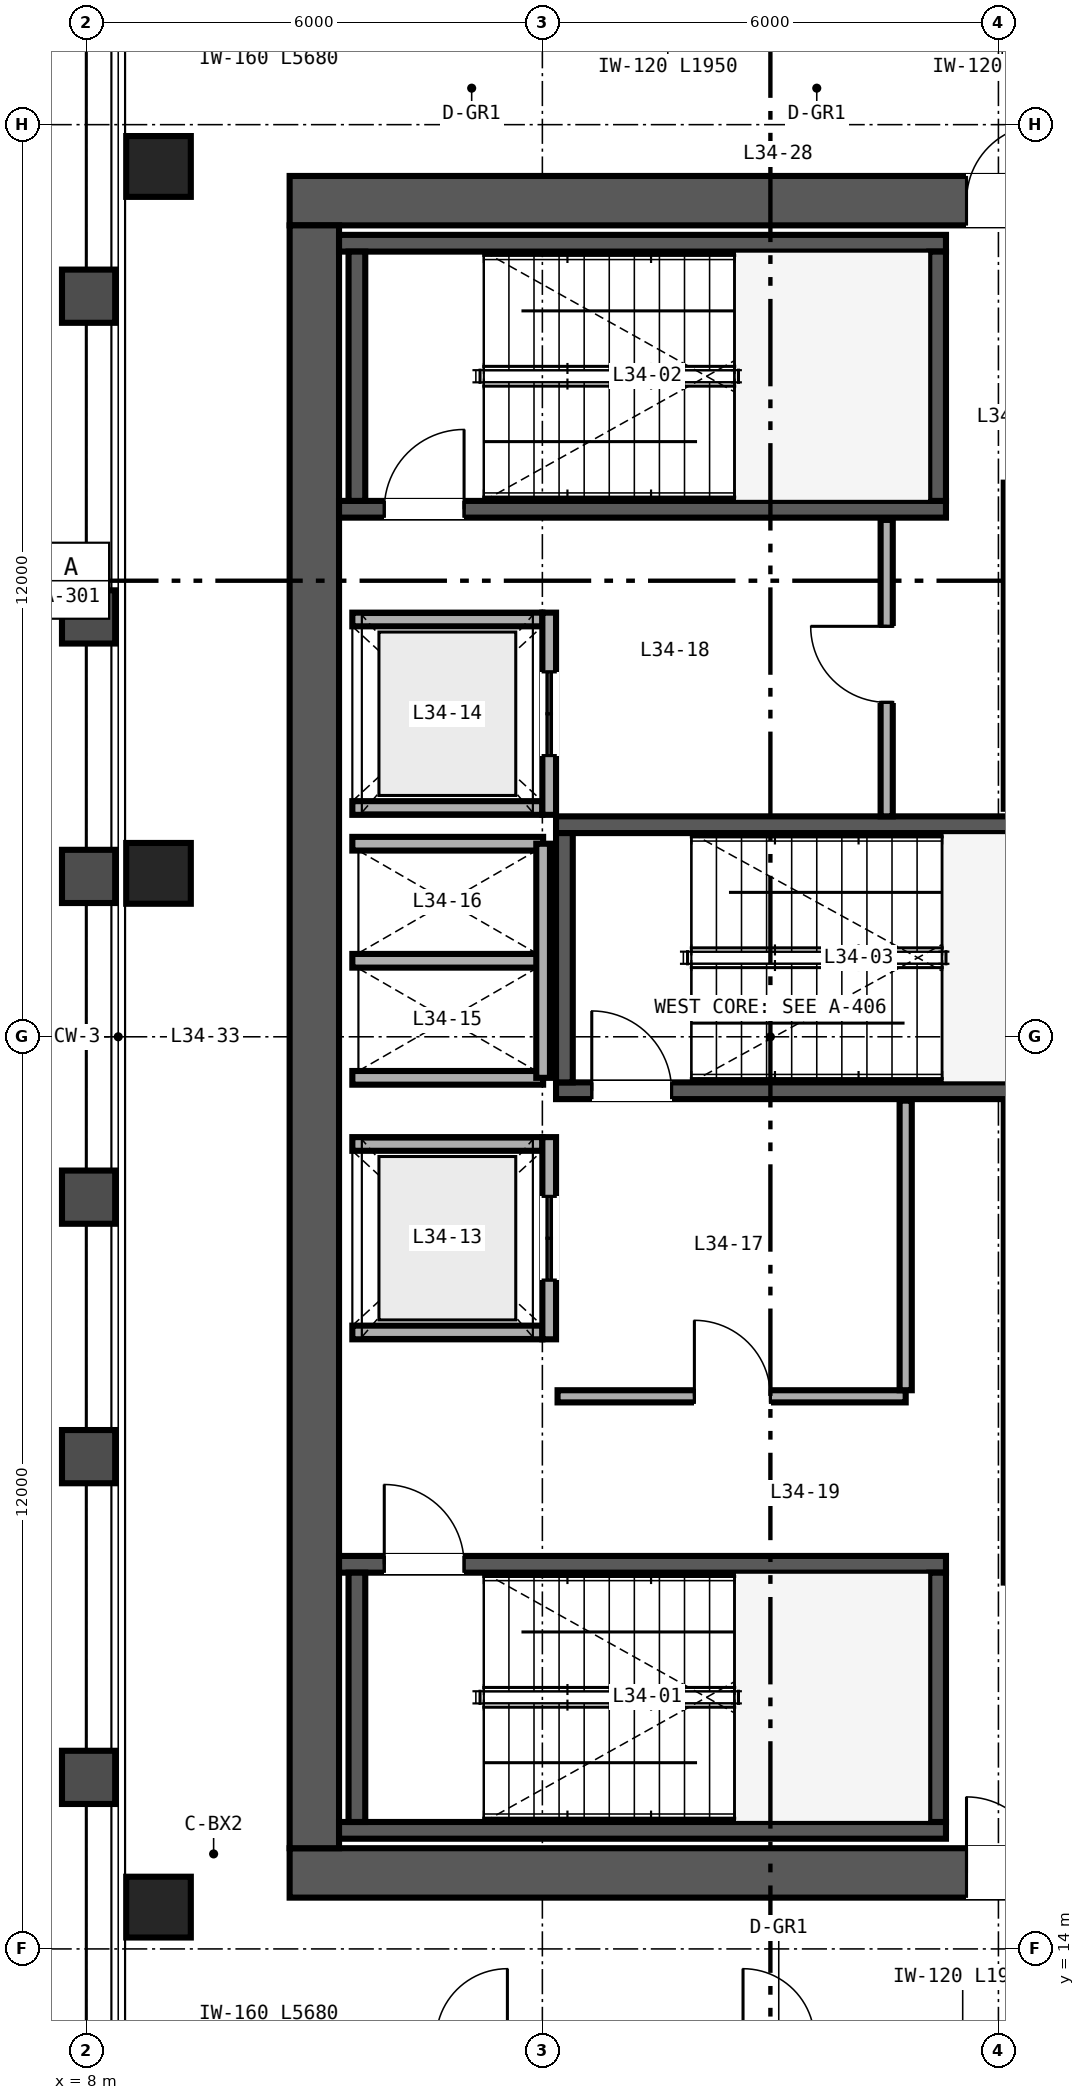
"""IFC4 building model, lengths in metres.
Left out: names, types, materials, properties, quantities, classifications, styles, units other than length and angle.
Written with IfcOpenShell. Run it as: python <this file> out.ifc"""

import sys

from ifc_helpers import new_model, si_unit, direction, frame, frame_2d, origin, origin_2d, place, context, subcontext, project, spatial, rectangle, hollow_rectangle, extrude, source, transform, mapped, element, fill, save


model = new_model("IFC4")
c1 = context("Model", 3, precision=1e-05, world=origin(), true_north=direction((0.0, 1.0)))
c2 = subcontext(c1, "Body", "Model", "MODEL_VIEW")
j1 = project(units=[si_unit("LENGTHUNIT", "METRE"), si_unit("PLANEANGLEUNIT", "RADIAN")], contexts=[c1])
p1 = place(None, origin())
s1 = spatial("IfcSite", under=j1, at=p1, CompositionType="ELEMENT")
p2 = place(p1, origin())
s2 = spatial("IfcBuilding", under=s1, at=p2, CompositionType="ELEMENT")
p3 = place(p2, frame((0.0, 0.0, 136.8)))
s3 = spatial("IfcBuildingStorey", under=s2, at=p3, CompositionType="ELEMENT", Elevation=136.8)
p4 = place(p3, frame((10.675, 15.0, 0.0), z_axis=(0.0, 0.0, 1.0), x_axis=(1.0, 0.0, 0.0)))
e1 = element("IfcWall", 1, at=p4, inside=s3, PredefinedType="SHEAR", context=c2, shape_type="SweptSolid", body=[
    extrude(rectangle(XDim=12.65, YDim=0.65, at=frame_2d((6.325, 0.0))), origin(), (0.0, 0.0, 1.0), 3.36),
])
p5 = place(p4, frame((8.905, 0.0, 0.0)))
e2 = element("IfcOpeningElement", 2, at=p5, cuts=e1, PredefinedType="OPENING", context=c2, shape_type="SweptSolid", body=[
    extrude(rectangle(XDim=1.0, YDim=2.15, at=frame_2d((0.5, 1.075))), frame((0.0, 0.335, 0.0), z_axis=(0.0, -1.0, 0.0), x_axis=(1.0, 0.0, 0.0)), (0.0, 0.0, 1.0), 0.67),
])
p6 = place(p3, frame((10.675, 37.0, 0.0), z_axis=(0.0, 0.0, 1.0), x_axis=(1.0, 0.0, 0.0)))
e3 = element("IfcWall", 3, at=p6, inside=s3, PredefinedType="SHEAR", context=c2, shape_type="SweptSolid", body=[
    extrude(rectangle(XDim=12.65, YDim=0.65, at=frame_2d((6.325, 0.0))), origin(), (0.0, 0.0, 1.0), 3.36),
])
p7 = place(p6, frame((8.905, 0.0, 0.0)))
e4 = element("IfcOpeningElement", 4, at=p7, cuts=e3, PredefinedType="OPENING", context=c2, shape_type="SweptSolid", body=[
    extrude(rectangle(XDim=1.0, YDim=2.15, at=frame_2d((0.5, 1.075))), frame((0.0, 0.335, 0.0), z_axis=(0.0, -1.0, 0.0), x_axis=(1.0, 0.0, 0.0)), (0.0, 0.0, 1.0), 0.67),
])
p8 = place(p3, frame((11.0, 15.325, 0.0), z_axis=(0.0, 0.0, 1.0), x_axis=(0.0, 1.0, 0.0)))
e5 = element("IfcWall", 5, at=p8, inside=s3, PredefinedType="SHEAR", context=c2, shape_type="SweptSolid", body=[
    extrude(rectangle(XDim=21.35, YDim=0.65, at=frame_2d((10.675, 0.0))), origin(), (0.0, 0.0, 1.0), 3.36),
])
p9 = place(p3, frame((11.325, 15.56, 0.0), z_axis=(0.0, 0.0, 1.0), x_axis=(1.0, 0.0, 0.0)))
e6 = element("IfcWall", 6, at=p9, inside=s3, PredefinedType="SHEAR", context=c2, shape_type="SweptSolid", body=[
    extrude(rectangle(XDim=7.985, YDim=0.22, at=frame_2d((3.993, 0.0))), origin(), (0.0, 0.0, 1.0), 3.4),
])
p10 = place(p3, frame((11.325, 19.06, 0.0), z_axis=(0.0, 0.0, 1.0), x_axis=(1.0, 0.0, 0.0)))
e7 = element("IfcWall", 7, at=p10, inside=s3, PredefinedType="SHEAR", context=c2, shape_type="SweptSolid", body=[
    extrude(rectangle(XDim=7.985, YDim=0.22, at=frame_2d((3.993, 0.0))), origin(), (0.0, 0.0, 1.0), 3.4),
])
p11 = place(p10, frame((0.595, 0.0, 0.0)))
e8 = element("IfcOpeningElement", 8, at=p11, cuts=e7, PredefinedType="OPENING", context=c2, shape_type="SweptSolid", body=[
    extrude(rectangle(XDim=1.05, YDim=2.15, at=frame_2d((0.525, 1.075))), frame((0.0, 0.12, 0.0), z_axis=(0.0, -1.0, 0.0), x_axis=(1.0, 0.0, 0.0)), (0.0, 0.0, 1.0), 0.24),
])
for number, where, z_axis, x_axis in (
    (9, (11.56, 15.67, 0.0), (0.0, 0.0, 1.0), (0.0, 1.0, 0.0)),
    (10, (19.2, 15.67, 0.0), (0.0, 0.0, 1.0), (0.0, 1.0, 0.0)),
):
    element("IfcWall", number, at=place(p3, frame(where, z_axis=z_axis, x_axis=x_axis)), inside=s3, PredefinedType="SHEAR", context=c2, shape_type="SweptSolid", body=[
        extrude(rectangle(XDim=3.28, YDim=0.22, at=frame_2d((1.64, 0.0))), origin(), (0.0, 0.0, 1.0), 3.4),
    ])
p12 = place(p3, frame((11.325, 32.94, 0.0), z_axis=(0.0, 0.0, 1.0), x_axis=(1.0, 0.0, 0.0)))
e11 = element("IfcWall", 11, at=p12, inside=s3, PredefinedType="SHEAR", context=c2, shape_type="SweptSolid", body=[
    extrude(rectangle(XDim=7.985, YDim=0.22, at=frame_2d((3.993, 0.0))), origin(), (0.0, 0.0, 1.0), 3.4),
])
p13 = place(p12, frame((0.595, 0.0, 0.0)))
e12 = element("IfcOpeningElement", 12, at=p13, cuts=e11, PredefinedType="OPENING", context=c2, shape_type="SweptSolid", body=[
    extrude(rectangle(XDim=1.05, YDim=2.15, at=frame_2d((0.525, 1.075))), frame((0.0, 0.12, 0.0), z_axis=(0.0, -1.0, 0.0), x_axis=(1.0, 0.0, 0.0)), (0.0, 0.0, 1.0), 0.24),
])
p14 = place(p3, frame((11.325, 36.44, 0.0), z_axis=(0.0, 0.0, 1.0), x_axis=(1.0, 0.0, 0.0)))
e13 = element("IfcWall", 13, at=p14, inside=s3, PredefinedType="SHEAR", context=c2, shape_type="SweptSolid", body=[
    extrude(rectangle(XDim=7.985, YDim=0.22, at=frame_2d((3.993, 0.0))), origin(), (0.0, 0.0, 1.0), 3.4),
])
for number, where, z_axis, x_axis in (
    (14, (11.56, 33.05, 0.0), (0.0, 0.0, 1.0), (0.0, 1.0, 0.0)),
    (15, (19.2, 33.05, 0.0), (0.0, 0.0, 1.0), (0.0, 1.0, 0.0)),
):
    element("IfcWall", number, at=place(p3, frame(where, z_axis=z_axis, x_axis=x_axis)), inside=s3, PredefinedType="SHEAR", context=c2, shape_type="SweptSolid", body=[
        extrude(rectangle(XDim=3.28, YDim=0.22, at=frame_2d((1.64, 0.0))), origin(), (0.0, 0.0, 1.0), 3.4),
    ])
p15 = place(p3, frame((14.18, 25.29, 0.0), z_axis=(0.0, 0.0, 1.0), x_axis=(1.0, 0.0, 0.0)))
e16 = element("IfcWall", 16, at=p15, inside=s3, PredefinedType="SHEAR", context=c2, shape_type="SweptSolid", body=[
    extrude(rectangle(XDim=8.495, YDim=0.22, at=frame_2d((4.248, 0.0))), origin(), (0.0, 0.0, 1.0), 3.4),
])
p16 = place(p15, frame((0.47, 0.0, 0.0)))
e17 = element("IfcOpeningElement", 17, at=p16, cuts=e16, PredefinedType="OPENING", context=c2, shape_type="SweptSolid", body=[
    extrude(rectangle(XDim=1.05, YDim=2.15, at=frame_2d((0.525, 1.075))), frame((0.0, 0.12, 0.0), z_axis=(0.0, -1.0, 0.0), x_axis=(1.0, 0.0, 0.0)), (0.0, 0.0, 1.0), 0.24),
])
p17 = place(p3, frame((14.18, 28.79, 0.0), z_axis=(0.0, 0.0, 1.0), x_axis=(1.0, 0.0, 0.0)))
e18 = element("IfcWall", 18, at=p17, inside=s3, PredefinedType="SHEAR", context=c2, shape_type="SweptSolid", body=[
    extrude(rectangle(XDim=8.495, YDim=0.22, at=frame_2d((4.248, 0.0))), origin(), (0.0, 0.0, 1.0), 3.4),
])
p18 = place(p3, frame((14.29, 25.4, 0.0), z_axis=(0.0, 0.0, 1.0), x_axis=(0.0, 1.0, 0.0)))
e19 = element("IfcWall", 19, at=p18, inside=s3, PredefinedType="SHEAR", context=c2, shape_type="SweptSolid", body=[
    extrude(rectangle(XDim=3.28, YDim=0.22, at=frame_2d((1.64, 0.0))), origin(), (0.0, 0.0, 1.0), 3.4),
])
m1 = source(origin(), c2, "Body", "SweptSolid", [
    extrude(hollow_rectangle(XDim=0.85, YDim=0.8, WallThickness=0.032, at=origin_2d()), origin(), (0.0, 0.0, 1.0), 3.36),
])
for number, where, z_axis, x_axis in (
    (20, (8.95, 14.55, 0.0), (0.0, 0.0, 1.0), (1.0, 0.0, 0.0)),
    (21, (8.95, 28.15, 0.0), (0.0, 0.0, 1.0), (1.0, 0.0, 0.0)),
    (22, (8.95, 37.45, 0.0), (0.0, 0.0, 1.0), (1.0, 0.0, 0.0)),
):
    element("IfcColumn", number, at=place(p3, frame(where, z_axis=z_axis, x_axis=x_axis)), inside=s3, PredefinedType="COLUMN", context=c2, shape_type="MappedRepresentation", body=[
        mapped(m1, transform((0.0, 0.0, 0.0), scale=1.0)),
    ])
p19 = place(p3, frame((20.16, 18.82, 0.0), z_axis=(0.0, 0.0, 1.0), x_axis=(0.0, 1.0, 0.0)))
e23 = element("IfcWall", 23, at=p19, inside=s3, PredefinedType="SOLIDWALL", context=c2, shape_type="SweptSolid", body=[
    extrude(rectangle(XDim=6.32, YDim=0.18, at=frame_2d((3.16, 0.0))), origin(), (0.0, 0.0, 1.0), 2.36),
])
p20 = place(p3, frame((20.16, 29.0, 0.0), z_axis=(0.0, 0.0, 1.0), x_axis=(0.0, 1.0, 0.0)))
e24 = element("IfcWall", 24, at=p20, inside=s3, PredefinedType="SOLIDWALL", context=c2, shape_type="SweptSolid", body=[
    extrude(rectangle(XDim=4.29, YDim=0.18, at=frame_2d((2.145, 0.0))), origin(), (0.0, 0.0, 1.0), 3.36),
])
for number, where, z_axis, x_axis in (
    (25, (11.5, 22.11, 0.0), (0.0, 0.0, 1.0), (1.0, 0.0, 0.0)),
    (26, (11.5, 24.59, 0.0), (0.0, 0.0, 1.0), (1.0, 0.0, 0.0)),
):
    element("IfcWall", number, at=place(p3, frame(where, z_axis=z_axis, x_axis=x_axis)), inside=s3, PredefinedType="SOLIDWALL", context=c2, shape_type="SweptSolid", body=[
        extrude(rectangle(XDim=2.5, YDim=0.18, at=frame_2d((1.25, 0.0))), origin(), (0.0, 0.0, 1.0), 3.36),
    ])
p21 = place(p3, frame((14.09, 22.02, 0.0), z_axis=(0.0, 0.0, 1.0), x_axis=(0.0, 1.0, 0.0)))
e27 = element("IfcWall", 27, at=p21, inside=s3, PredefinedType="SOLIDWALL", context=c2, shape_type="SweptSolid", body=[
    extrude(rectangle(XDim=2.66, YDim=0.18, at=frame_2d((1.33, 0.0))), origin(), (0.0, 0.0, 1.0), 3.36),
])
p22 = place(p21, frame((0.78, 0.0, 0.0)))
e28 = element("IfcOpeningElement", 28, at=p22, cuts=e27, PredefinedType="OPENING", context=c2, shape_type="SweptSolid", body=[
    extrude(rectangle(XDim=1.1, YDim=2.2, at=frame_2d((0.55, 1.1))), frame((0.0, 0.1, 0.0), z_axis=(0.0, -1.0, 0.0), x_axis=(1.0, 0.0, 0.0)), (0.0, 0.0, 1.0), 0.2),
])
for number, where, z_axis, x_axis in (
    (29, (11.5, 29.01, 0.0), (0.0, 0.0, 1.0), (1.0, 0.0, 0.0)),
    (30, (11.5, 31.49, 0.0), (0.0, 0.0, 1.0), (1.0, 0.0, 0.0)),
):
    element("IfcWall", number, at=place(p3, frame(where, z_axis=z_axis, x_axis=x_axis)), inside=s3, PredefinedType="SOLIDWALL", context=c2, shape_type="SweptSolid", body=[
        extrude(rectangle(XDim=2.5, YDim=0.18, at=frame_2d((1.25, 0.0))), origin(), (0.0, 0.0, 1.0), 3.36),
    ])
p23 = place(p3, frame((14.09, 28.92, 0.0), z_axis=(0.0, 0.0, 1.0), x_axis=(0.0, 1.0, 0.0)))
e31 = element("IfcWall", 31, at=p23, inside=s3, PredefinedType="SOLIDWALL", context=c2, shape_type="SweptSolid", body=[
    extrude(rectangle(XDim=2.66, YDim=0.18, at=frame_2d((1.33, 0.0))), origin(), (0.0, 0.0, 1.0), 3.36),
])
p24 = place(p23, frame((0.78, 0.0, 0.0)))
e32 = element("IfcOpeningElement", 32, at=p24, cuts=e31, PredefinedType="OPENING", context=c2, shape_type="SweptSolid", body=[
    extrude(rectangle(XDim=1.1, YDim=2.2, at=frame_2d((0.55, 1.1))), frame((0.0, 0.1, 0.0), z_axis=(0.0, -1.0, 0.0), x_axis=(1.0, 0.0, 0.0)), (0.0, 0.0, 1.0), 0.2),
])
for number, where, z_axis, x_axis in (
    (33, (11.5, 25.46, 0.0), (0.0, 0.0, 1.0), (1.0, 0.0, 0.0)),
    (34, (11.5, 27.0, 0.0), (0.0, 0.0, 1.0), (1.0, 0.0, 0.0)),
    (35, (11.5, 28.54, 0.0), (0.0, 0.0, 1.0), (1.0, 0.0, 0.0)),
):
    element("IfcWall", number, at=place(p3, frame(where, z_axis=z_axis, x_axis=x_axis)), inside=s3, PredefinedType="SOLIDWALL", context=c2, shape_type="SweptSolid", body=[
        extrude(rectangle(XDim=2.51, YDim=0.18, at=frame_2d((1.255, 0.0))), origin(), (0.0, 0.0, 1.0), 3.36),
    ])
p25 = place(p3, frame((14.01, 25.46, 0.0), z_axis=(0.0, 0.0, 1.0), x_axis=(0.0, 1.0, 0.0)))
e36 = element("IfcWall", 36, at=p25, inside=s3, PredefinedType="SOLIDWALL", context=c2, shape_type="SweptSolid", body=[
    extrude(rectangle(XDim=3.08, YDim=0.18, at=frame_2d((1.54, 0.0))), origin(), (0.0, 0.0, 1.0), 3.36),
])
p26 = place(p3, frame((14.2, 21.27, 0.0), z_axis=(0.0, 0.0, 1.0), x_axis=(1.0, 0.0, 0.0)))
e37 = element("IfcWall", 37, at=p26, inside=s3, PredefinedType="PARTITIONING", context=c2, shape_type="SweptSolid", body=[
    extrude(rectangle(XDim=4.58, YDim=0.16, at=frame_2d((2.29, 0.0))), origin(), (0.0, 0.0, 1.0), 3.36),
])
p27 = place(p26, frame((1.8, 0.0, 0.0)))
e38 = element("IfcOpeningElement", 38, at=p27, cuts=e37, PredefinedType="OPENING", context=c2, shape_type="SweptSolid", body=[
    extrude(rectangle(XDim=1.0, YDim=2.15, at=frame_2d((0.5, 1.075))), frame((0.0, 0.09, 0.0), z_axis=(0.0, -1.0, 0.0), x_axis=(1.0, 0.0, 0.0)), (0.0, 0.0, 1.0), 0.18),
])
p28 = place(p3, frame((18.78, 21.35, 0.0), z_axis=(0.0, 0.0, 1.0), x_axis=(0.0, 1.0, 0.0)))
e39 = element("IfcWall", 39, at=p28, inside=s3, PredefinedType="PARTITIONING", context=c2, shape_type="SweptSolid", body=[
    extrude(rectangle(XDim=3.81, YDim=0.16, at=frame_2d((1.905, 0.0))), origin(), (0.0, 0.0, 1.0), 3.36),
])
p29 = place(p3, frame((18.53, 28.9, 0.0), z_axis=(0.0, 0.0, 1.0), x_axis=(0.0, 1.0, 0.0)))
e40 = element("IfcWall", 40, at=p29, inside=s3, PredefinedType="PARTITIONING", context=c2, shape_type="SweptSolid", body=[
    extrude(rectangle(XDim=3.9, YDim=0.16, at=frame_2d((1.95, 0.0))), origin(), (0.0, 0.0, 1.0), 3.36),
])
p30 = place(p29, frame((1.5, 0.0, 0.0)))
e41 = element("IfcOpeningElement", 41, at=p30, cuts=e40, PredefinedType="OPENING", context=c2, shape_type="SweptSolid", body=[
    extrude(rectangle(XDim=1.0, YDim=2.15, at=frame_2d((0.5, 1.075))), frame((0.0, 0.09, 0.0), z_axis=(0.0, -1.0, 0.0), x_axis=(1.0, 0.0, 0.0)), (0.0, 0.0, 1.0), 0.18),
])
m2 = source(origin(), c2, "Body", "SweptSolid", [
    extrude(rectangle(XDim=1.05, YDim=2.15, at=frame_2d((0.525, 1.075))), frame((0.0, 0.025, 0.0), z_axis=(0.0, -1.0, 0.0), x_axis=(1.0, 0.0, 0.0)), (0.0, 0.0, 1.0), 0.05),
])
p31 = place(p11, origin())
e42 = element("IfcDoor", 42, at=p31, inside=s3, OperationType="SINGLE_SWING_LEFT", PredefinedType="DOOR", context=c2, shape_type="MappedRepresentation", body=[
    mapped(m2, transform((0.0, 0.0, 0.0), scale=1.0)),
])
fill(e8, e42)
p32 = place(p13, origin())
e43 = element("IfcDoor", 43, at=p32, inside=s3, OperationType="SINGLE_SWING_RIGHT", PredefinedType="DOOR", context=c2, shape_type="MappedRepresentation", body=[
    mapped(m2, transform((0.0, 0.0, 0.0), scale=1.0)),
])
fill(e12, e43)
p33 = place(p16, origin())
e44 = element("IfcDoor", 44, at=p33, inside=s3, OperationType="SINGLE_SWING_LEFT", PredefinedType="DOOR", context=c2, shape_type="MappedRepresentation", body=[
    mapped(m2, transform((0.0, 0.0, 0.0), scale=1.0)),
])
fill(e17, e44)
m3 = source(origin(), c2, "Body", "SweptSolid", [
    extrude(rectangle(XDim=1.1, YDim=2.2, at=frame_2d((0.55, 1.1))), frame((0.0, 0.025, 0.0), z_axis=(0.0, -1.0, 0.0), x_axis=(1.0, 0.0, 0.0)), (0.0, 0.0, 1.0), 0.05),
])
p34 = place(p22, origin())
e45 = element("IfcDoor", 45, at=p34, inside=s3, OperationType="DOUBLE_DOOR_SLIDING", PredefinedType="DOOR", context=c2, shape_type="MappedRepresentation", body=[
    mapped(m3, transform((0.0, 0.0, 0.0), scale=1.0)),
])
fill(e28, e45)
p35 = place(p24, origin())
e46 = element("IfcDoor", 46, at=p35, inside=s3, OperationType="DOUBLE_DOOR_SLIDING", PredefinedType="DOOR", context=c2, shape_type="MappedRepresentation", body=[
    mapped(m3, transform((0.0, 0.0, 0.0), scale=1.0)),
])
fill(e32, e46)
m4 = source(origin(), c2, "Body", "SweptSolid", [
    extrude(rectangle(XDim=1.0, YDim=2.15, at=frame_2d((0.5, 1.075))), frame((0.0, 0.025, 0.0), z_axis=(0.0, -1.0, 0.0), x_axis=(1.0, 0.0, 0.0)), (0.0, 0.0, 1.0), 0.05),
])
p36 = place(p27, origin())
e47 = element("IfcDoor", 47, at=p36, inside=s3, OperationType="SINGLE_SWING_LEFT", PredefinedType="DOOR", context=c2, shape_type="MappedRepresentation", body=[
    mapped(m4, transform((0.0, 0.0, 0.0), scale=1.0)),
])
fill(e38, e47)
p37 = place(p30, origin())
e48 = element("IfcDoor", 48, at=p37, inside=s3, OperationType="SINGLE_SWING_RIGHT", PredefinedType="DOOR", context=c2, shape_type="MappedRepresentation", body=[
    mapped(m4, transform((0.0, 0.0, 0.0), scale=1.0)),
])
fill(e41, e48)
p38 = place(p5, origin())
e49 = element("IfcDoor", 49, at=p38, inside=s3, OperationType="SINGLE_SWING_LEFT", PredefinedType="DOOR", context=c2, shape_type="MappedRepresentation", body=[
    mapped(m4, transform((0.0, 0.0, 0.0), scale=1.0)),
])
fill(e2, e49)
p39 = place(p7, origin())
e50 = element("IfcDoor", 50, at=p39, inside=s3, OperationType="SINGLE_SWING_RIGHT", PredefinedType="DOOR", context=c2, shape_type="MappedRepresentation", body=[
    mapped(m4, transform((0.0, 0.0, 0.0), scale=1.0)),
])
fill(e4, e50)
save(model, sys.argv[1])
